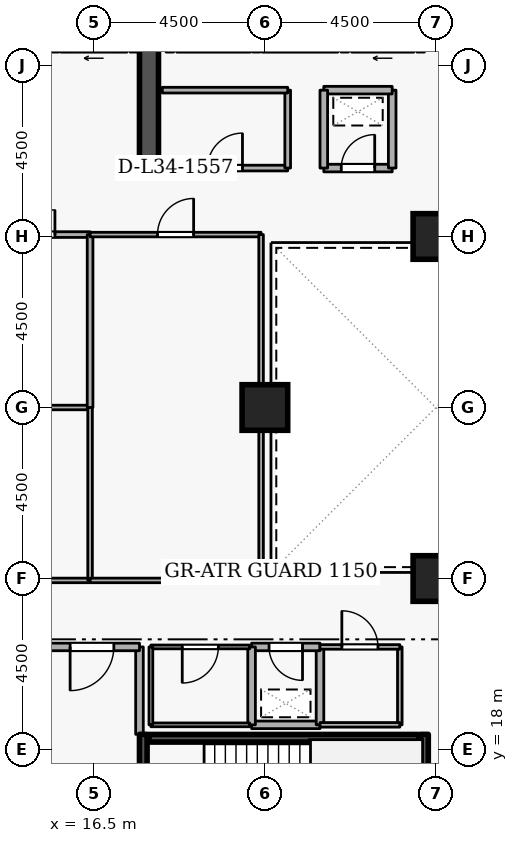
"""IFC4 building model, lengths in metres.
Left out: names, types, materials, properties, quantities, classifications, styles, units other than length and angle.
Written with IfcOpenShell. Run it as: python <this file> out.ifc"""

import sys

from ifc_helpers import new_model, si_unit, direction, frame, frame_2d, origin, origin_2d, place, context, subcontext, project, spatial, rectangle, extrude, element, fill, save


model = new_model("IFC4")
c1 = context("Model", 3, precision=1e-05, world=origin(), true_north=direction((0.0, 1.0)))
c2 = subcontext(c1, "Body", "Model", "MODEL_VIEW")
j1 = project(units=[si_unit("LENGTHUNIT", "METRE"), si_unit("PLANEANGLEUNIT", "RADIAN")], contexts=[c1])
p1 = place(None, origin())
s1 = spatial("IfcSite", under=j1, at=p1, CompositionType="ELEMENT")
p2 = place(p1, origin())
s2 = spatial("IfcBuilding", under=s1, at=p2, CompositionType="ELEMENT")
p3 = place(p2, frame((0.0, 0.0, 130.5)))
s3 = spatial("IfcBuildingStorey", under=s2, at=p3, CompositionType="ELEMENT", Elevation=130.5)
p4 = place(p3, frame((17.95, 33.1, 0.0), z_axis=(0.0, 0.0, 1.0), x_axis=(0.0, 1.0, 0.0)))
e1 = element("IfcWall", 1, at=p4, inside=s3, PredefinedType="SHEAR", context=c2, shape_type="SweptSolid", body=[
    extrude(rectangle(XDim=5.8, YDim=0.5, at=frame_2d((2.9, 0.0))), origin(), (0.0, 0.0, 1.0), 3.6),
])
for number, where, z_axis, x_axis in (
    (2, (25.5, 22.5, 0.0), (0.0, 0.0, 1.0), (1.0, 0.0, 0.0)),
    (3, (25.5, 31.5, 0.0), (0.0, 0.0, 1.0), (1.0, 0.0, 0.0)),
    (4, (21.0, 27.0, 0.0), (0.0, 0.0, 1.0), (1.0, 0.0, 0.0)),
):
    element("IfcColumn", number, at=place(p3, frame(where, z_axis=z_axis, x_axis=x_axis)), inside=s3, PredefinedType="COLUMN", context=c2, shape_type="SweptSolid", body=[
        extrude(rectangle(XDim=1.2, YDim=1.2, at=origin_2d()), origin(), (0.0, 0.0, 1.0), 3.6),
    ])
p5 = place(p3, frame((24.92, 36.45, 0.0), z_axis=(0.0, 0.0, 1.0), x_axis=(-1.0, 0.0, 0.0)))
e5 = element("IfcWall", 5, at=p5, inside=s3, PredefinedType="STANDARD", context=c2, shape_type="SweptSolid", body=[
    extrude(rectangle(XDim=1.64, YDim=0.2, at=frame_2d((0.82, 0.0))), origin(), (0.0, 0.0, 1.0), 3.34),
])
p6 = place(p5, frame((0.31, 0.0, 0.0)))
e6 = element("IfcOpeningElement", 6, at=p6, cuts=e5, PredefinedType="OPENING", context=c2, shape_type="SweptSolid", body=[
    extrude(rectangle(XDim=1.02, YDim=2.06, at=frame_2d((0.51, 1.03))), frame((0.0, 0.11, 0.0), z_axis=(0.0, -1.0, 0.0), x_axis=(1.0, 0.0, 0.0)), (0.0, 0.0, 1.0), 0.22),
])
p7 = place(p3, frame((22.92, 36.45, 0.0), z_axis=(0.0, 0.0, 1.0), x_axis=(-1.0, 0.0, 0.0)))
e7 = element("IfcWall", 7, at=p7, inside=s3, PredefinedType="STANDARD", context=c2, shape_type="SweptSolid", body=[
    extrude(rectangle(XDim=1.99, YDim=0.2, at=frame_2d((0.995, 0.0))), origin(), (0.0, 0.0, 1.0), 3.34),
])
p8 = place(p3, frame((20.62, 36.45, 0.0), z_axis=(0.0, 0.0, 1.0), x_axis=(-1.0, 0.0, 0.0)))
e8 = element("IfcWall", 8, at=p8, inside=s3, PredefinedType="STANDARD", context=c2, shape_type="SweptSolid", body=[
    extrude(rectangle(XDim=1.94, YDim=0.2, at=frame_2d((0.97, 0.0))), origin(), (0.0, 0.0, 1.0), 3.34),
])
p9 = place(p3, frame((17.37, 36.45, 0.0), z_axis=(0.0, 0.0, 1.0), x_axis=(-1.0, 0.0, 0.0)))
e9 = element("IfcWall", 9, at=p9, inside=s3, PredefinedType="STANDARD", context=c2, shape_type="SweptSolid", body=[
    extrude(rectangle(XDim=1.74, YDim=0.2, at=frame_2d((0.87, 0.0))), origin(), (0.0, 0.0, 1.0), 3.34),
])
p10 = place(p9, frame((0.36, 0.0, 0.0)))
e10 = element("IfcOpeningElement", 10, at=p10, cuts=e9, PredefinedType="OPENING", context=c2, shape_type="SweptSolid", body=[
    extrude(rectangle(XDim=1.02, YDim=2.06, at=frame_2d((0.51, 1.03))), frame((0.0, 0.11, 0.0), z_axis=(0.0, -1.0, 0.0), x_axis=(1.0, 0.0, 0.0)), (0.0, 0.0, 1.0), 0.22),
])
p11 = place(p3, frame((17.8, 15.05, 0.0), z_axis=(0.0, 0.0, 1.0), x_axis=(0.0, 1.0, 0.0)))
e11 = element("IfcWall", 11, at=p11, inside=s3, PredefinedType="SHEAR", context=c2, shape_type="SweptSolid", body=[
    extrude(rectangle(XDim=3.35, YDim=0.2, at=frame_2d((1.675, 0.0))), origin(), (0.0, 0.0, 1.0), 3.6),
])
p12 = place(p11, frame((1.125, 0.0, 0.0)))
e12 = element("IfcOpeningElement", 12, at=p12, cuts=e11, PredefinedType="OPENING", context=c2, shape_type="SweptSolid", body=[
    extrude(rectangle(XDim=1.1, YDim=2.1, at=frame_2d((0.55, 1.05))), frame((0.0, 0.11, 0.0), z_axis=(0.0, -1.0, 0.0), x_axis=(1.0, 0.0, 0.0)), (0.0, 0.0, 1.0), 0.22),
])
p13 = place(p3, frame((25.2, 18.4, 0.0), z_axis=(0.0, 0.0, 1.0), x_axis=(0.0, -1.0, 0.0)))
e13 = element("IfcWall", 13, at=p13, inside=s3, PredefinedType="SHEAR", context=c2, shape_type="SweptSolid", body=[
    extrude(rectangle(XDim=3.35, YDim=0.2, at=frame_2d((1.675, 0.0))), origin(), (0.0, 0.0, 1.0), 3.6),
])
p14 = place(p3, frame((25.05, 18.297, 0.0), z_axis=(0.0, 0.0, 1.0), x_axis=(-1.0, 0.0, 0.0)))
e14 = element("IfcWall", 14, at=p14, inside=s3, PredefinedType="SHEAR", context=c2, shape_type="SweptSolid", body=[
    extrude(rectangle(XDim=7.1, YDim=0.2, at=frame_2d((3.55, 0.0))), origin(), (0.0, 0.0, 1.0), 3.6),
])
p15 = place(p3, frame((17.7, 18.4, 0.0), z_axis=(0.0, 0.0, 1.0), x_axis=(0.0, 1.0, 0.0)))
e15 = element("IfcWall", 15, at=p15, inside=s3, PredefinedType="STANDARD", context=c2, shape_type="SweptSolid", body=[
    extrude(rectangle(XDim=2.3, YDim=0.2, at=frame_2d((1.15, 0.0))), origin(), (0.0, 0.0, 1.0), 2.545),
])
p16 = place(p3, frame((17.7, 20.7, 0.0), z_axis=(0.0, 0.0, 1.0), x_axis=(-1.0, 0.0, 0.0)))
e16 = element("IfcWall", 16, at=p16, inside=s3, PredefinedType="STANDARD", context=c2, shape_type="SweptSolid", body=[
    extrude(rectangle(XDim=2.5, YDim=0.2, at=frame_2d((1.25, 0.0))), origin(), (0.0, 0.0, 1.0), 3.34),
])
p17 = place(p16, frame((0.675, 0.0, 0.0)))
e17 = element("IfcOpeningElement", 17, at=p17, cuts=e16, PredefinedType="OPENING", context=c2, shape_type="SweptSolid", body=[
    extrude(rectangle(XDim=1.15, YDim=2.1, at=frame_2d((0.575, 1.05))), frame((0.0, 0.11, 0.0), z_axis=(0.0, -1.0, 0.0), x_axis=(1.0, 0.0, 0.0)), (0.0, 0.0, 1.0), 0.22),
])
p18 = place(p3, frame((20.65, 18.65, 0.0), z_axis=(0.0, 0.0, 1.0), x_axis=(1.0, 0.0, 0.0)))
e18 = element("IfcWall", 18, at=p18, inside=s3, PredefinedType="STANDARD", context=c2, shape_type="SweptSolid", body=[
    extrude(rectangle(XDim=1.8, YDim=0.2, at=frame_2d((0.9, 0.0))), origin(), (0.0, 0.0, 1.0), 3.34),
])
p19 = place(p3, frame((22.45, 18.65, 0.0), z_axis=(0.0, 0.0, 1.0), x_axis=(0.0, 1.0, 0.0)))
e19 = element("IfcWall", 19, at=p19, inside=s3, PredefinedType="STANDARD", context=c2, shape_type="SweptSolid", body=[
    extrude(rectangle(XDim=2.05, YDim=0.2, at=frame_2d((1.025, 0.0))), origin(), (0.0, 0.0, 1.0), 3.34),
])
p20 = place(p3, frame((22.45, 20.7, 0.0), z_axis=(0.0, 0.0, 1.0), x_axis=(-1.0, 0.0, 0.0)))
e20 = element("IfcWall", 20, at=p20, inside=s3, PredefinedType="STANDARD", context=c2, shape_type="SweptSolid", body=[
    extrude(rectangle(XDim=1.8, YDim=0.2, at=frame_2d((0.9, 0.0))), origin(), (0.0, 0.0, 1.0), 3.34),
])
p21 = place(p20, frame((0.46, 0.0, 0.0)))
e21 = element("IfcOpeningElement", 21, at=p21, cuts=e20, PredefinedType="OPENING", context=c2, shape_type="SweptSolid", body=[
    extrude(rectangle(XDim=0.88, YDim=2.04, at=frame_2d((0.44, 1.02))), frame((0.0, 0.11, 0.0), z_axis=(0.0, -1.0, 0.0), x_axis=(1.0, 0.0, 0.0)), (0.0, 0.0, 1.0), 0.22),
])
p22 = place(p3, frame((20.65, 20.7, 0.0), z_axis=(0.0, 0.0, 1.0), x_axis=(0.0, -1.0, 0.0)))
e22 = element("IfcWall", 22, at=p22, inside=s3, PredefinedType="STANDARD", context=c2, shape_type="SweptSolid", body=[
    extrude(rectangle(XDim=2.05, YDim=0.2, at=frame_2d((1.025, 0.0))), origin(), (0.0, 0.0, 1.0), 3.34),
])
p23 = place(p3, frame((22.55, 33.3, 0.0), z_axis=(0.0, 0.0, 1.0), x_axis=(1.0, 0.0, 0.0)))
e23 = element("IfcWall", 23, at=p23, inside=s3, PredefinedType="STANDARD", context=c2, shape_type="SweptSolid", body=[
    extrude(rectangle(XDim=1.8, YDim=0.2, at=frame_2d((0.9, 0.0))), origin(), (0.0, 0.0, 1.0), 3.34),
])
p24 = place(p23, frame((0.46, 0.0, 0.0)))
e24 = element("IfcOpeningElement", 24, at=p24, cuts=e23, PredefinedType="OPENING", context=c2, shape_type="SweptSolid", body=[
    extrude(rectangle(XDim=0.88, YDim=2.04, at=frame_2d((0.44, 1.02))), frame((0.0, 0.11, 0.0), z_axis=(0.0, -1.0, 0.0), x_axis=(1.0, 0.0, 0.0)), (0.0, 0.0, 1.0), 0.22),
])
p25 = place(p3, frame((24.35, 33.3, 0.0), z_axis=(0.0, 0.0, 1.0), x_axis=(0.0, 1.0, 0.0)))
e25 = element("IfcWall", 25, at=p25, inside=s3, PredefinedType="STANDARD", context=c2, shape_type="SweptSolid", body=[
    extrude(rectangle(XDim=2.05, YDim=0.2, at=frame_2d((1.025, 0.0))), origin(), (0.0, 0.0, 1.0), 3.34),
])
p26 = place(p3, frame((24.35, 35.35, 0.0), z_axis=(0.0, 0.0, 1.0), x_axis=(-1.0, 0.0, 0.0)))
e26 = element("IfcWall", 26, at=p26, inside=s3, PredefinedType="STANDARD", context=c2, shape_type="SweptSolid", body=[
    extrude(rectangle(XDim=1.8, YDim=0.2, at=frame_2d((0.9, 0.0))), origin(), (0.0, 0.0, 1.0), 3.34),
])
p27 = place(p3, frame((22.55, 35.35, 0.0), z_axis=(0.0, 0.0, 1.0), x_axis=(0.0, -1.0, 0.0)))
e27 = element("IfcWall", 27, at=p27, inside=s3, PredefinedType="STANDARD", context=c2, shape_type="SweptSolid", body=[
    extrude(rectangle(XDim=2.05, YDim=0.2, at=frame_2d((1.025, 0.0))), origin(), (0.0, 0.0, 1.0), 3.34),
])
p28 = place(p3, frame((18.0, 18.65, 0.0), z_axis=(0.0, 0.0, 1.0), x_axis=(1.0, 0.0, 0.0)))
e28 = element("IfcWall", 28, at=p28, inside=s3, PredefinedType="PARTITIONING", context=c2, shape_type="SweptSolid", body=[
    extrude(rectangle(XDim=2.6, YDim=0.1, at=frame_2d((1.3, 0.0))), origin(), (0.0, 0.0, 1.0), 3.34),
])
p29 = place(p3, frame((20.6, 20.7, 0.0), z_axis=(0.0, 0.0, 1.0), x_axis=(-1.0, 0.0, 0.0)))
e29 = element("IfcWall", 29, at=p29, inside=s3, PredefinedType="PARTITIONING", context=c2, shape_type="SweptSolid", body=[
    extrude(rectangle(XDim=2.6, YDim=0.1, at=frame_2d((1.3, 0.0))), origin(), (0.0, 0.0, 1.0), 3.34),
])
p30 = place(p29, frame((0.825, 0.0, 0.0)))
e30 = element("IfcOpeningElement", 30, at=p30, cuts=e29, PredefinedType="OPENING", context=c2, shape_type="SweptSolid", body=[
    extrude(rectangle(XDim=0.95, YDim=2.1, at=frame_2d((0.475, 1.05))), frame((0.0, 0.06, 0.0), z_axis=(0.0, -1.0, 0.0), x_axis=(1.0, 0.0, 0.0)), (0.0, 0.0, 1.0), 0.12),
])
p31 = place(p3, frame((18.0, 20.7, 0.0), z_axis=(0.0, 0.0, 1.0), x_axis=(0.0, -1.0, 0.0)))
e31 = element("IfcWall", 31, at=p31, inside=s3, PredefinedType="PARTITIONING", context=c2, shape_type="SweptSolid", body=[
    extrude(rectangle(XDim=2.05, YDim=0.1, at=frame_2d((1.025, 0.0))), origin(), (0.0, 0.0, 1.0), 2.545),
])
p32 = place(p3, frame((24.55, 20.7, 0.0), z_axis=(0.0, 0.0, 1.0), x_axis=(0.0, -1.0, 0.0)))
e32 = element("IfcWall", 32, at=p32, inside=s3, PredefinedType="PARTITIONING", context=c2, shape_type="SweptSolid", body=[
    extrude(rectangle(XDim=2.05, YDim=0.12, at=frame_2d((1.025, 0.0))), origin(), (0.0, 0.0, 1.0), 3.34),
])
p33 = place(p3, frame((24.55, 18.65, 0.0), z_axis=(0.0, 0.0, 1.0), x_axis=(-1.0, 0.0, 0.0)))
e33 = element("IfcWall", 33, at=p33, inside=s3, PredefinedType="PARTITIONING", context=c2, shape_type="SweptSolid", body=[
    extrude(rectangle(XDim=2.1, YDim=0.12, at=frame_2d((1.05, 0.0))), origin(), (0.0, 0.0, 1.0), 3.34),
])
p34 = place(p3, frame((22.45, 20.7, 0.0), z_axis=(0.0, 0.0, 1.0), x_axis=(1.0, 0.0, 0.0)))
e34 = element("IfcWall", 34, at=p34, inside=s3, PredefinedType="PARTITIONING", context=c2, shape_type="SweptSolid", body=[
    extrude(rectangle(XDim=2.1, YDim=0.12, at=frame_2d((1.05, 0.0))), origin(), (0.0, 0.0, 1.0), 3.34),
])
p35 = place(p34, frame((0.575, 0.0, 0.0)))
e35 = element("IfcOpeningElement", 35, at=p35, cuts=e34, PredefinedType="OPENING", context=c2, shape_type="SweptSolid", body=[
    extrude(rectangle(XDim=0.95, YDim=2.1, at=frame_2d((0.475, 1.05))), frame((0.0, 0.07, 0.0), z_axis=(0.0, -1.0, 0.0), x_axis=(1.0, 0.0, 0.0)), (0.0, 0.0, 1.0), 0.14),
])
p36 = place(p3, frame((18.3, 33.3, 0.0), z_axis=(0.0, 0.0, 1.0), x_axis=(1.0, 0.0, 0.0)))
e36 = element("IfcWall", 36, at=p36, inside=s3, PredefinedType="PARTITIONING", context=c2, shape_type="SweptSolid", body=[
    extrude(rectangle(XDim=3.3, YDim=0.15, at=frame_2d((1.65, 0.0))), origin(), (0.0, 0.0, 1.0), 3.34),
])
p37 = place(p36, frame((1.19, 0.0, 0.0)))
e37 = element("IfcOpeningElement", 37, at=p37, cuts=e36, PredefinedType="OPENING", context=c2, shape_type="SweptSolid", body=[
    extrude(rectangle(XDim=0.92, YDim=2.08, at=frame_2d((0.46, 1.04))), frame((0.0, 0.085, 0.0), z_axis=(0.0, -1.0, 0.0), x_axis=(1.0, 0.0, 0.0)), (0.0, 0.0, 1.0), 0.17),
])
p38 = place(p3, frame((21.6, 33.3, 0.0), z_axis=(0.0, 0.0, 1.0), x_axis=(0.0, 1.0, 0.0)))
e38 = element("IfcWall", 38, at=p38, inside=s3, PredefinedType="PARTITIONING", context=c2, shape_type="SweptSolid", body=[
    extrude(rectangle(XDim=2.05, YDim=0.15, at=frame_2d((1.025, 0.0))), origin(), (0.0, 0.0, 1.0), 3.34),
])
p39 = place(p3, frame((21.6, 35.35, 0.0), z_axis=(0.0, 0.0, 1.0), x_axis=(-1.0, 0.0, 0.0)))
e39 = element("IfcWall", 39, at=p39, inside=s3, PredefinedType="PARTITIONING", context=c2, shape_type="SweptSolid", body=[
    extrude(rectangle(XDim=3.3, YDim=0.15, at=frame_2d((1.65, 0.0))), origin(), (0.0, 0.0, 1.0), 3.34),
])
p40 = place(p3, frame((16.4, 22.45, 0.0), z_axis=(0.0, 0.0, 1.0), x_axis=(-1.0, 0.0, 0.0)))
e40 = element("IfcWall", 40, at=p40, inside=s3, PredefinedType="PARTITIONING", context=c2, shape_type="SweptSolid", body=[
    extrude(rectangle(XDim=1.2, YDim=0.12, at=frame_2d((0.6, 0.0))), origin(), (0.0, 0.0, 1.0), 3.34),
])
p41 = place(p3, frame((1.78, 27.0, 0.0), z_axis=(0.0, 0.0, 1.0), x_axis=(1.0, 0.0, 0.0)))
e41 = element("IfcWall", 41, at=p41, inside=s3, PredefinedType="PARTITIONING", context=c2, shape_type="SweptSolid", body=[
    extrude(rectangle(XDim=14.62, YDim=0.12, at=frame_2d((7.31, 0.0))), origin(), (0.0, 0.0, 1.0), 2.878),
])
p42 = place(p3, frame((16.4, 27.0, 0.0), z_axis=(0.0, 0.0, 1.0), x_axis=(0.0, -1.0, 0.0)))
e42 = element("IfcWall", 42, at=p42, inside=s3, PredefinedType="PARTITIONING", context=c2, shape_type="SweptSolid", body=[
    extrude(rectangle(XDim=4.55, YDim=0.12, at=frame_2d((2.275, 0.0))), origin(), (0.0, 0.0, 1.0), 3.34),
])
p43 = place(p3, frame((13.25, 31.55, 0.0), z_axis=(0.0, 0.0, 1.0), x_axis=(1.0, 0.0, 0.0)))
e43 = element("IfcWall", 43, at=p43, inside=s3, PredefinedType="PARTITIONING", context=c2, shape_type="SweptSolid", body=[
    extrude(rectangle(XDim=3.15, YDim=0.15, at=frame_2d((1.575, 0.0))), origin(), (0.0, 0.0, 1.0), 3.34),
])
p44 = place(p43, frame((0.925, 0.0, 0.0)))
e44 = element("IfcOpeningElement", 44, at=p44, cuts=e43, PredefinedType="OPENING", context=c2, shape_type="SweptSolid", body=[
    extrude(rectangle(XDim=1.3, YDim=2.12, at=frame_2d((0.65, 1.06))), frame((0.0, 0.085, 0.0), z_axis=(0.0, -1.0, 0.0), x_axis=(1.0, 0.0, 0.0)), (0.0, 0.0, 1.0), 0.17),
])
p45 = place(p3, frame((16.4, 31.55, 0.0), z_axis=(0.0, 0.0, 1.0), x_axis=(0.0, -1.0, 0.0)))
e45 = element("IfcWall", 45, at=p45, inside=s3, PredefinedType="PARTITIONING", context=c2, shape_type="SweptSolid", body=[
    extrude(rectangle(XDim=4.55, YDim=0.15, at=frame_2d((2.275, 0.0))), origin(), (0.0, 0.0, 1.0), 3.34),
])
p46 = place(p3, frame((16.4, 31.55, 0.0), z_axis=(0.0, 0.0, 1.0), x_axis=(1.0, 0.0, 0.0)))
e46 = element("IfcWall", 46, at=p46, inside=s3, PredefinedType="PARTITIONING", context=c2, shape_type="SweptSolid", body=[
    extrude(rectangle(XDim=4.5, YDim=0.12, at=frame_2d((2.25, 0.0))), origin(), (0.0, 0.0, 1.0), 3.34),
])
p47 = place(p46, frame((1.775, 0.0, 0.0)))
e47 = element("IfcOpeningElement", 47, at=p47, cuts=e46, PredefinedType="OPENING", context=c2, shape_type="SweptSolid", body=[
    extrude(rectangle(XDim=0.95, YDim=2.1, at=frame_2d((0.475, 1.05))), frame((0.0, 0.07, 0.0), z_axis=(0.0, -1.0, 0.0), x_axis=(1.0, 0.0, 0.0)), (0.0, 0.0, 1.0), 0.14),
])
p48 = place(p3, frame((20.9, 31.55, 0.0), z_axis=(0.0, 0.0, 1.0), x_axis=(0.0, -1.0, 0.0)))
e48 = element("IfcWall", 48, at=p48, inside=s3, PredefinedType="PARTITIONING", context=c2, shape_type="SweptSolid", body=[
    extrude(rectangle(XDim=9.1, YDim=0.12, at=frame_2d((4.55, 0.0))), origin(), (0.0, 0.0, 1.0), 3.34),
])
p49 = place(p3, frame((20.9, 22.45, 0.0), z_axis=(0.0, 0.0, 1.0), x_axis=(-1.0, 0.0, 0.0)))
e49 = element("IfcWall", 49, at=p49, inside=s3, PredefinedType="PARTITIONING", context=c2, shape_type="SweptSolid", body=[
    extrude(rectangle(XDim=4.5, YDim=0.12, at=frame_2d((2.25, 0.0))), origin(), (0.0, 0.0, 1.0), 3.34),
])
p50 = place(p17, origin())
e50 = element("IfcDoor", 50, at=p50, inside=s3, OperationType="SINGLE_SWING_RIGHT", PredefinedType="DOOR", context=c2, shape_type="SweptSolid", body=[
    extrude(rectangle(XDim=1.15, YDim=2.1, at=frame_2d((0.575, 1.05))), frame((0.0, 0.025, 0.0), z_axis=(0.0, -1.0, 0.0), x_axis=(1.0, 0.0, 0.0)), (0.0, 0.0, 1.0), 0.05),
])
fill(e17, e50)
p51 = place(p21, origin())
e51 = element("IfcDoor", 51, at=p51, inside=s3, OperationType="SINGLE_SWING_LEFT", PredefinedType="DOOR", context=c2, shape_type="SweptSolid", body=[
    extrude(rectangle(XDim=0.88, YDim=2.04, at=frame_2d((0.44, 1.02))), frame((0.0, 0.025, 0.0), z_axis=(0.0, -1.0, 0.0), x_axis=(1.0, 0.0, 0.0)), (0.0, 0.0, 1.0), 0.05),
])
fill(e21, e51)
p52 = place(p24, origin())
e52 = element("IfcDoor", 52, at=p52, inside=s3, OperationType="SINGLE_SWING_RIGHT", PredefinedType="DOOR", context=c2, shape_type="SweptSolid", body=[
    extrude(rectangle(XDim=0.88, YDim=2.04, at=frame_2d((0.44, 1.02))), frame((0.0, 0.025, 0.0), z_axis=(0.0, -1.0, 0.0), x_axis=(1.0, 0.0, 0.0)), (0.0, 0.0, 1.0), 0.05),
])
fill(e24, e52)
p53 = place(p30, origin())
e53 = element("IfcDoor", 53, at=p53, inside=s3, OperationType="SINGLE_SWING_RIGHT", PredefinedType="DOOR", context=c2, shape_type="SweptSolid", body=[
    extrude(rectangle(XDim=0.95, YDim=2.1, at=frame_2d((0.475, 1.05))), frame((0.0, 0.025, 0.0), z_axis=(0.0, -1.0, 0.0), x_axis=(1.0, 0.0, 0.0)), (0.0, 0.0, 1.0), 0.05),
])
fill(e30, e53)
p54 = place(p35, origin())
e54 = element("IfcDoor", 54, at=p54, inside=s3, OperationType="SINGLE_SWING_LEFT", PredefinedType="DOOR", context=c2, shape_type="SweptSolid", body=[
    extrude(rectangle(XDim=0.95, YDim=2.1, at=frame_2d((0.475, 1.05))), frame((0.0, 0.025, 0.0), z_axis=(0.0, -1.0, 0.0), x_axis=(1.0, 0.0, 0.0)), (0.0, 0.0, 1.0), 0.05),
])
fill(e35, e54)
p55 = place(p37, origin())
e55 = element("IfcDoor", 55, at=p55, inside=s3, OperationType="SINGLE_SWING_RIGHT", PredefinedType="DOOR", context=c2, shape_type="SweptSolid", body=[
    extrude(rectangle(XDim=0.92, YDim=2.08, at=frame_2d((0.46, 1.04))), frame((0.0, 0.025, 0.0), z_axis=(0.0, -1.0, 0.0), x_axis=(1.0, 0.0, 0.0)), (0.0, 0.0, 1.0), 0.05),
])
fill(e37, e55)
p56 = place(p44, origin())
e56 = element("IfcDoor", 56, at=p56, inside=s3, OperationType="DOUBLE_DOOR_SINGLE_SWING", PredefinedType="DOOR", context=c2, shape_type="SweptSolid", body=[
    extrude(rectangle(XDim=1.3, YDim=2.12, at=frame_2d((0.65, 1.06))), frame((0.0, 0.025, 0.0), z_axis=(0.0, -1.0, 0.0), x_axis=(1.0, 0.0, 0.0)), (0.0, 0.0, 1.0), 0.05),
])
fill(e44, e56)
p57 = place(p47, origin())
e57 = element("IfcDoor", 57, at=p57, inside=s3, OperationType="SINGLE_SWING_RIGHT", PredefinedType="DOOR", context=c2, shape_type="SweptSolid", body=[
    extrude(rectangle(XDim=0.95, YDim=2.1, at=frame_2d((0.475, 1.05))), frame((0.0, 0.025, 0.0), z_axis=(0.0, -1.0, 0.0), x_axis=(1.0, 0.0, 0.0)), (0.0, 0.0, 1.0), 0.05),
])
fill(e47, e57)
save(model, sys.argv[1])
